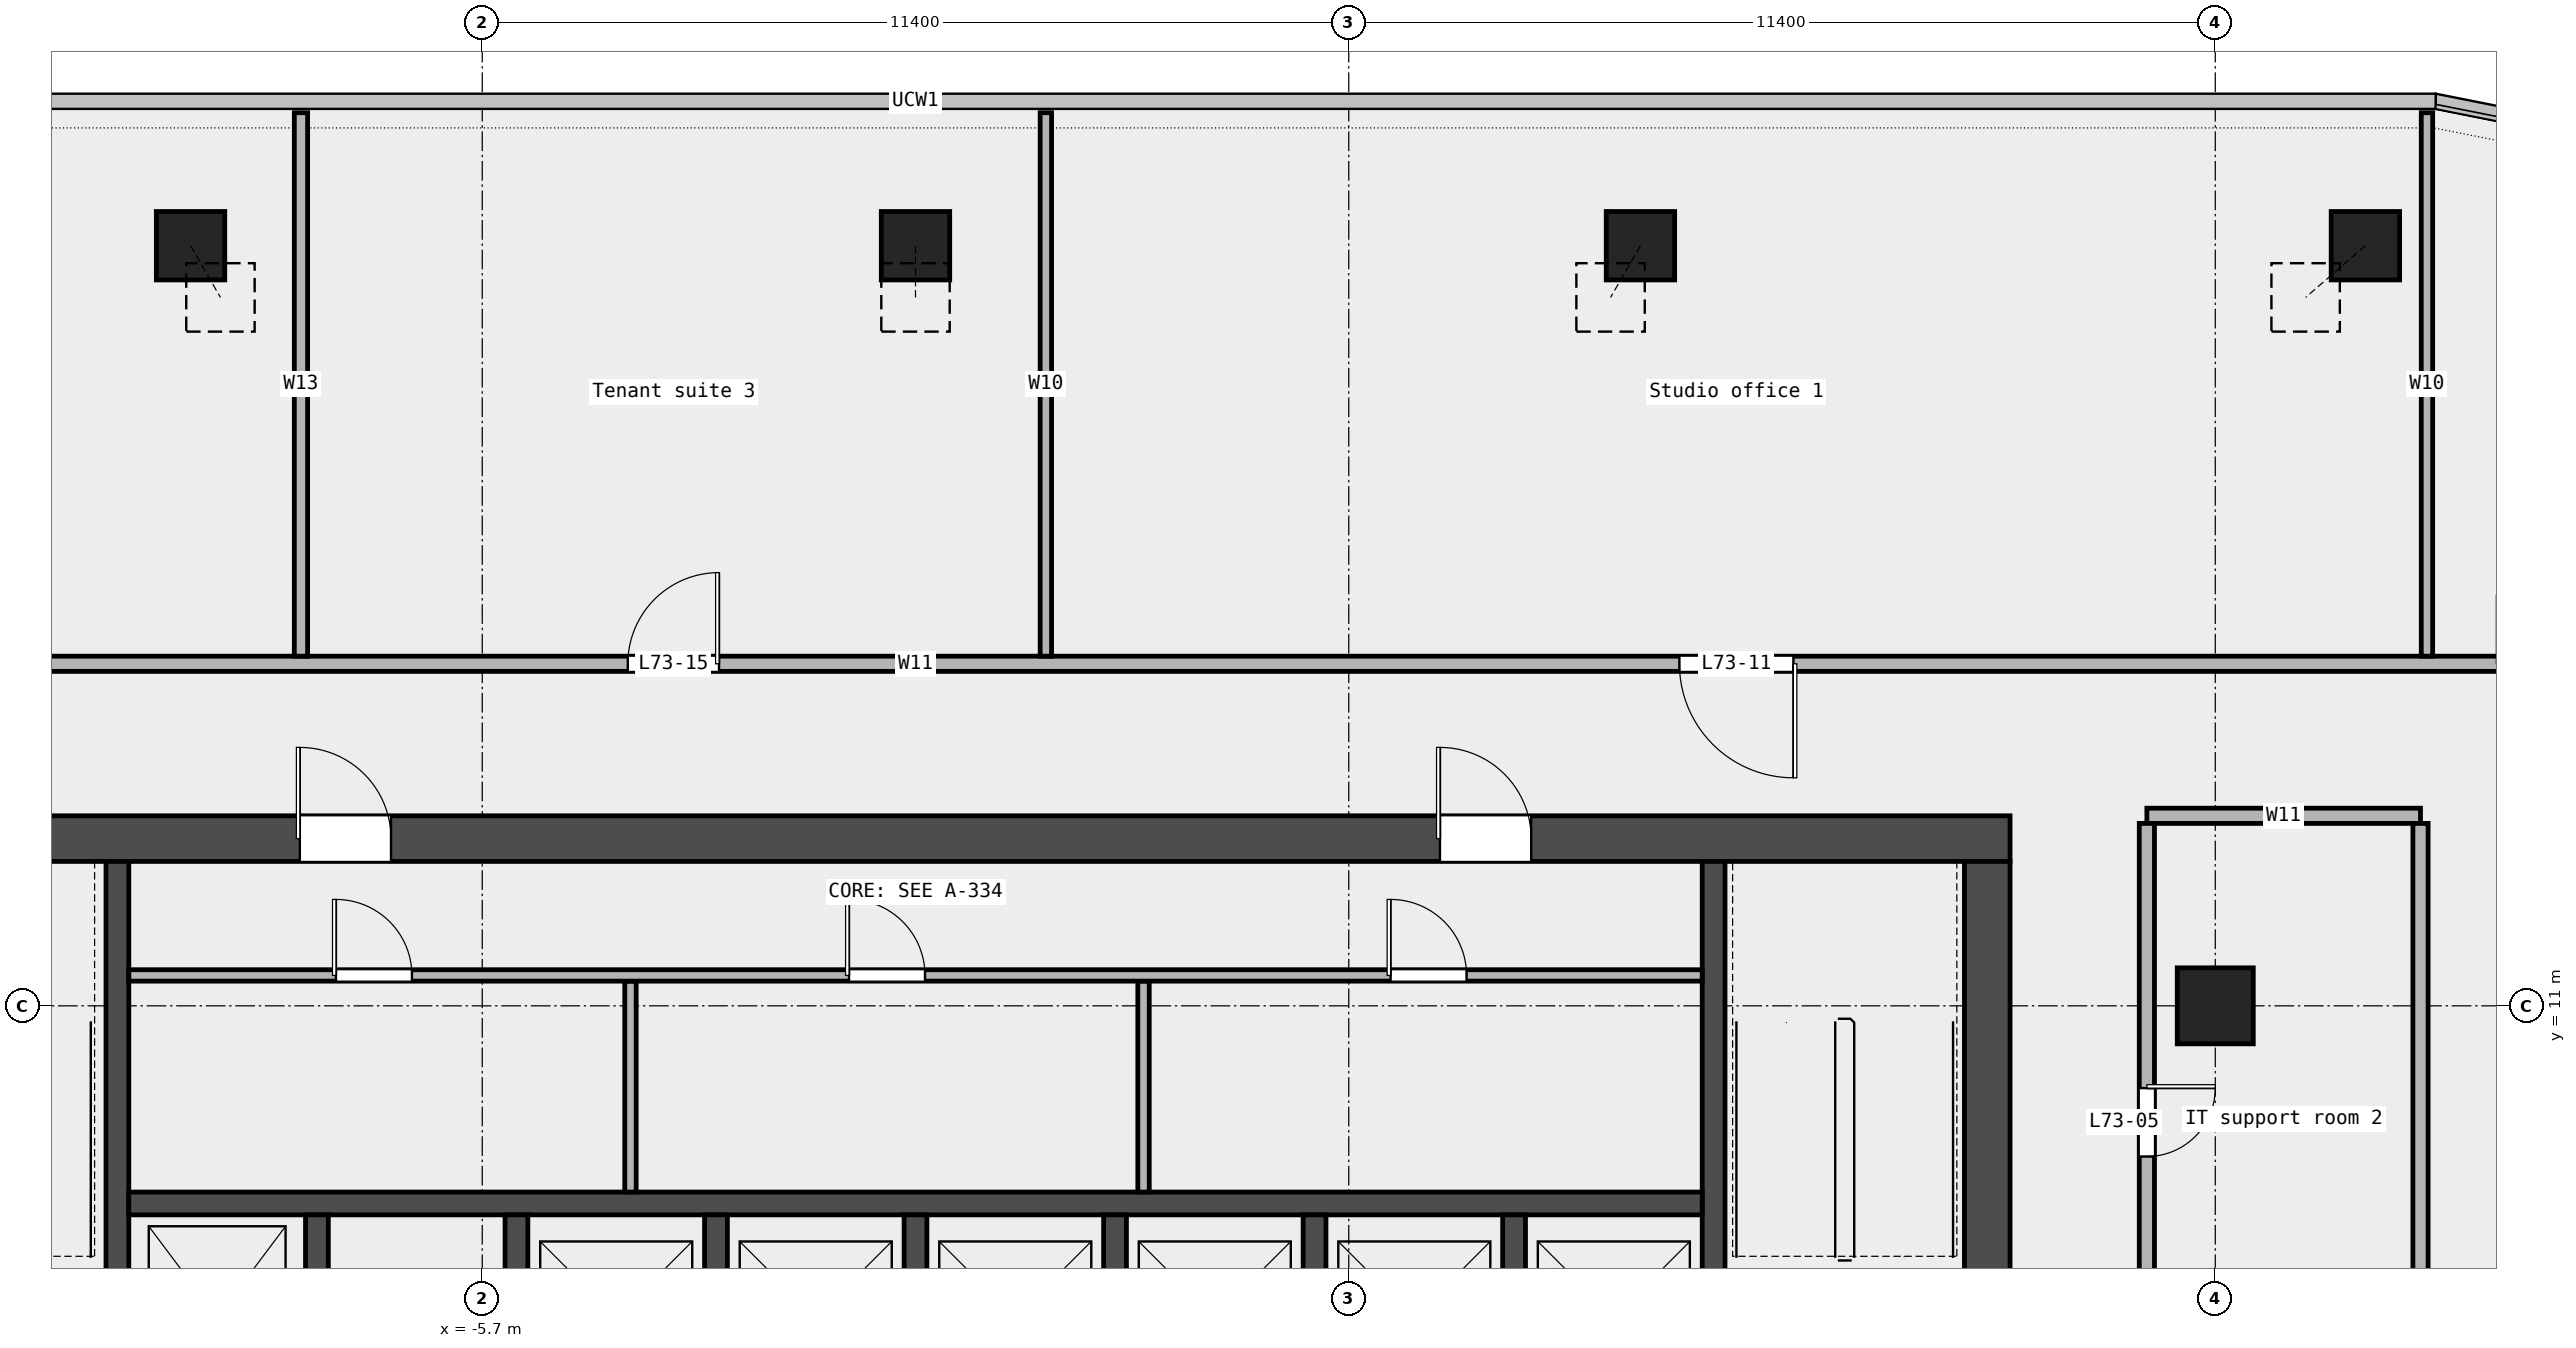
"""IFC4 building model, lengths in metres.
Left out: names, types, materials, properties, quantities, classifications, styles, units other than length and angle.
Written with IfcOpenShell. Run it as: python <this file> out.ifc"""

import sys

from ifc_helpers import new_model, si_unit, direction, frame, frame_2d, origin, origin_2d, place, context, subcontext, project, spatial, rectangle, extrude, element, fill, save


model = new_model("IFC4")
c1 = context("Model", 3, precision=1e-05, world=origin(), true_north=direction((0.0, 1.0)))
c2 = subcontext(c1, "Body", "Model", "MODEL_VIEW")
j1 = project(units=[si_unit("LENGTHUNIT", "METRE"), si_unit("PLANEANGLEUNIT", "RADIAN")], contexts=[c1])
p1 = place(None, origin())
s1 = spatial("IfcSite", under=j1, at=p1, CompositionType="ELEMENT")
p2 = place(p1, origin())
s2 = spatial("IfcBuilding", under=s1, at=p2, CompositionType="ELEMENT")
p3 = place(p2, frame((0.0, 0.0, 333.4)))
s3 = spatial("IfcBuildingStorey", under=s2, at=p3, CompositionType="ELEMENT", Elevation=333.4)
p4 = place(p3, frame((19.075, 21.0, 0.0), z_axis=(-0.221170997512, -0.19123291775, 0.95630191939), x_axis=(0.654053885671, -0.756447958976, 0.0)))
e1 = element("IfcColumn", 1, at=p4, inside=s3, PredefinedType="COLUMN", context=c2, shape_type="SweptSolid", body=[
    extrude(rectangle(XDim=0.9, YDim=0.9, at=origin_2d()), origin(), (0.0, 0.0, 1.0), 3.555),
])
p5 = place(p3, frame((9.538, 21.0, 0.0), z_axis=(-0.112706165104, -0.194839646068, 0.974338151089), x_axis=(0.865610650408, -0.500717686825, 0.0)))
e2 = element("IfcColumn", 2, at=p5, inside=s3, PredefinedType="COLUMN", context=c2, shape_type="SweptSolid", body=[
    extrude(rectangle(XDim=0.9, YDim=0.9, at=origin_2d()), origin(), (0.0, 0.0, 1.0), 3.49),
])
p6 = place(p3, frame((0.0, 21.0, 0.0), z_axis=(0.0, -0.19608905468, 0.980586091394), x_axis=(1.0, 0.0, 0.0)))
e3 = element("IfcColumn", 3, at=p6, inside=s3, PredefinedType="COLUMN", context=c2, shape_type="SweptSolid", body=[
    extrude(rectangle(XDim=0.9, YDim=0.9, at=origin_2d()), origin(), (0.0, 0.0, 1.0), 3.468),
])
p7 = place(p3, frame((-9.538, 21.0, 0.0), z_axis=(0.112706165104, -0.194839646068, 0.974338151089), x_axis=(0.865610650408, 0.500717686825, 0.0)))
e4 = element("IfcColumn", 4, at=p7, inside=s3, PredefinedType="COLUMN", context=c2, shape_type="SweptSolid", body=[
    extrude(rectangle(XDim=0.9, YDim=0.9, at=origin_2d()), origin(), (0.0, 0.0, 1.0), 3.49),
])
p8 = place(p3, frame((17.1, 11.0, 0.0), z_axis=(0.0, 0.0, 1.0), x_axis=(1.0, 0.0, 0.0)))
e5 = element("IfcColumn", 5, at=p8, inside=s3, PredefinedType="COLUMN", context=c2, shape_type="SweptSolid", body=[
    extrude(rectangle(XDim=1.0, YDim=1.0, at=origin_2d()), origin(), (0.0, 0.0, 1.0), 3.4),
])
p9 = place(p3, frame((16.2, 13.5, 0.0), z_axis=(0.0, 0.0, 1.0), x_axis=(1.0, 0.0, 0.0)))
e6 = element("IfcWall", 6, at=p9, inside=s3, PredefinedType="PARTITIONING", context=c2, shape_type="SweptSolid", body=[
    extrude(rectangle(XDim=3.6, YDim=0.2, at=frame_2d((1.8, 0.0))), origin(), (0.0, 0.0, 1.0), 3.4),
])
p10 = place(p3, frame((-22.7, 15.5, 0.0), z_axis=(0.0, 0.0, 1.0), x_axis=(1.0, 0.0, 0.0)))
e7 = element("IfcWall", 7, at=p10, inside=s3, PredefinedType="PARTITIONING", context=c2, shape_type="SweptSolid", body=[
    extrude(rectangle(XDim=45.4, YDim=0.2, at=frame_2d((22.7, 0.0))), origin(), (0.0, 0.0, 1.0), 3.4),
])
p11 = place(p10, frame((43.542, 0.0, 0.0)))
e8 = element("IfcOpeningElement", 8, at=p11, cuts=e7, PredefinedType="OPENING", context=c2, shape_type="SweptSolid", body=[
    extrude(rectangle(XDim=0.9, YDim=2.1, at=frame_2d((0.45, 1.05))), frame((0.0, 0.112, 0.0), z_axis=(0.0, -1.0, 0.0), x_axis=(1.0, 0.0, 0.0)), (0.0, 0.0, 1.0), 0.224),
])
p12 = place(p10, frame((32.75, 0.0, 0.0)))
e9 = element("IfcOpeningElement", 9, at=p12, cuts=e7, PredefinedType="OPENING", context=c2, shape_type="SweptSolid", body=[
    extrude(rectangle(XDim=1.5, YDim=2.1, at=frame_2d((0.75, 1.05))), frame((0.0, 0.112, 0.0), z_axis=(0.0, -1.0, 0.0), x_axis=(1.0, 0.0, 0.0)), (0.0, 0.0, 1.0), 0.224),
])
p13 = place(p10, frame((18.915, 0.0, 0.0)))
e10 = element("IfcOpeningElement", 10, at=p13, cuts=e7, PredefinedType="OPENING", context=c2, shape_type="SweptSolid", body=[
    extrude(rectangle(XDim=1.2, YDim=2.1, at=frame_2d((0.6, 1.05))), frame((0.0, 0.112, 0.0), z_axis=(0.0, -1.0, 0.0), x_axis=(1.0, 0.0, 0.0)), (0.0, 0.0, 1.0), 0.224),
])
p14 = place(p10, frame((6.558, 0.0, 0.0)))
e11 = element("IfcOpeningElement", 11, at=p14, cuts=e7, PredefinedType="OPENING", context=c2, shape_type="SweptSolid", body=[
    extrude(rectangle(XDim=1.5, YDim=2.1, at=frame_2d((0.75, 1.05))), frame((0.0, 0.112, 0.0), z_axis=(0.0, -1.0, 0.0), x_axis=(1.0, 0.0, 0.0)), (0.0, 0.0, 1.0), 0.224),
])
p15 = place(p3, frame((-8.085, 15.6, 0.0), z_axis=(0.0, 0.0, 1.0), x_axis=(0.0, 1.0, 0.0)))
e12 = element("IfcWall", 12, at=p15, inside=s3, PredefinedType="PARTITIONING", context=c2, shape_type="SweptSolid", body=[
    extrude(rectangle(XDim=7.15, YDim=0.175, at=frame_2d((3.575, 0.0))), origin(), (0.0, 0.0, 1.0), 3.4),
])
p16 = place(p3, frame((1.715, 15.6, 0.0), z_axis=(0.0, 0.0, 1.0), x_axis=(0.0, 1.0, 0.0)))
e13 = element("IfcWall", 13, at=p16, inside=s3, PredefinedType="PARTITIONING", context=c2, shape_type="SweptSolid", body=[
    extrude(rectangle(XDim=7.15, YDim=0.15, at=frame_2d((3.575, 0.0))), origin(), (0.0, 0.0, 1.0), 3.4),
])
p17 = place(p3, frame((16.2, -0.74, 0.0), z_axis=(0.0, 0.0, 1.0), x_axis=(0.0, 1.0, 0.0)))
e14 = element("IfcWall", 14, at=p17, inside=s3, PredefinedType="PARTITIONING", context=c2, shape_type="SweptSolid", body=[
    extrude(rectangle(XDim=14.14, YDim=0.2, at=frame_2d((7.07, 0.0))), origin(), (0.0, 0.0, 1.0), 3.4),
])
p18 = place(p17, frame((9.758, 0.0, 0.0)))
e15 = element("IfcOpeningElement", 15, at=p18, cuts=e14, PredefinedType="OPENING", context=c2, shape_type="SweptSolid", body=[
    extrude(rectangle(XDim=0.9, YDim=2.1, at=frame_2d((0.45, 1.05))), frame((0.0, 0.112, 0.0), z_axis=(0.0, -1.0, 0.0), x_axis=(1.0, 0.0, 0.0)), (0.0, 0.0, 1.0), 0.224),
])
p19 = place(p17, frame((2.637, 0.0, 0.0)))
e16 = element("IfcOpeningElement", 16, at=p19, cuts=e14, PredefinedType="OPENING", context=c2, shape_type="SweptSolid", body=[
    extrude(rectangle(XDim=1.0, YDim=2.1, at=frame_2d((0.5, 1.05))), frame((0.0, 0.112, 0.0), z_axis=(0.0, -1.0, 0.0), x_axis=(1.0, 0.0, 0.0)), (0.0, 0.0, 1.0), 0.224),
])
p20 = place(p3, frame((19.8, -0.74, 0.0), z_axis=(0.0, 0.0, 1.0), x_axis=(0.0, 1.0, 0.0)))
e17 = element("IfcWall", 17, at=p20, inside=s3, PredefinedType="PARTITIONING", context=c2, shape_type="SweptSolid", body=[
    extrude(rectangle(XDim=14.14, YDim=0.2, at=frame_2d((7.07, 0.0))), origin(), (0.0, 0.0, 1.0), 3.4),
])
p21 = place(p3, frame((19.885, 15.6, 0.0), z_axis=(0.0, 0.0, 1.0), x_axis=(0.0, 1.0, 0.0)))
e18 = element("IfcWall", 18, at=p21, inside=s3, PredefinedType="PARTITIONING", context=c2, shape_type="SweptSolid", body=[
    extrude(rectangle(XDim=7.15, YDim=0.15, at=frame_2d((3.575, 0.0))), origin(), (0.0, 0.0, 1.0), 3.4),
])
p22 = place(p3, frame((-14.4, 13.2, 0.0), z_axis=(0.0, 0.0, 1.0), x_axis=(1.0, 0.0, 0.0)))
e19 = element("IfcWall", 19, at=p22, inside=s3, PredefinedType="SHEAR", context=c2, shape_type="SweptSolid", body=[
    extrude(rectangle(XDim=28.8, YDim=0.6, at=frame_2d((14.4, 0.0))), origin(), (0.0, 0.0, 1.0), 3.7),
])
p23 = place(p22, frame((6.3, 0.0, 0.0)))
e20 = element("IfcOpeningElement", 20, at=p23, cuts=e19, PredefinedType="OPENING", context=c2, shape_type="SweptSolid", body=[
    extrude(rectangle(XDim=1.2, YDim=2.1, at=frame_2d((0.6, 1.05))), frame((0.0, 0.312, 0.0), z_axis=(0.0, -1.0, 0.0), x_axis=(1.0, 0.0, 0.0)), (0.0, 0.0, 1.0), 0.624),
])
p24 = place(p22, frame((21.3, 0.0, 0.0)))
e21 = element("IfcOpeningElement", 21, at=p24, cuts=e19, PredefinedType="OPENING", context=c2, shape_type="SweptSolid", body=[
    extrude(rectangle(XDim=1.2, YDim=2.1, at=frame_2d((0.6, 1.05))), frame((0.0, 0.312, 0.0), z_axis=(0.0, -1.0, 0.0), x_axis=(1.0, 0.0, 0.0)), (0.0, 0.0, 1.0), 0.624),
])
p25 = place(p3, frame((14.1, -6.6, 0.0), z_axis=(0.0, 0.0, 1.0), x_axis=(0.0, 1.0, 0.0)))
e22 = element("IfcWall", 22, at=p25, inside=s3, PredefinedType="SHEAR", context=c2, shape_type="SweptSolid", body=[
    extrude(rectangle(XDim=19.5, YDim=0.6, at=frame_2d((9.75, 0.0))), origin(), (0.0, 0.0, 1.0), 3.7),
])
p26 = place(p25, frame((9.3, 0.0, 0.0)))
e23 = element("IfcOpeningElement", 23, at=p26, cuts=e22, PredefinedType="OPENING", context=c2, shape_type="SweptSolid", body=[
    extrude(rectangle(XDim=1.8, YDim=2.1, at=frame_2d((0.9, 1.05))), frame((0.0, 0.312, 0.0), z_axis=(0.0, -1.0, 0.0), x_axis=(1.0, 0.0, 0.0)), (0.0, 0.0, 1.0), 0.624),
])
for number, where, z_axis, x_axis in (
    (24, (-10.5, 5.25, 0.0), (0.0, 0.0, 1.0), (0.0, 1.0, 0.0)),
    (25, (10.5, 5.25, 0.0), (0.0, 0.0, 1.0), (0.0, 1.0, 0.0)),
):
    element("IfcWall", number, at=place(p3, frame(where, z_axis=z_axis, x_axis=x_axis)), inside=s3, PredefinedType="SHEAR", context=c2, shape_type="SweptSolid", body=[
        extrude(rectangle(XDim=7.65, YDim=0.3, at=frame_2d((3.825, 0.0))), origin(), (0.0, 0.0, 1.0), 3.7),
    ])
p27 = place(p3, frame((-10.35, 8.4, 0.0), z_axis=(0.0, 0.0, 1.0), x_axis=(1.0, 0.0, 0.0)))
e26 = element("IfcWall", 26, at=p27, inside=s3, PredefinedType="SOLIDWALL", context=c2, shape_type="SweptSolid", body=[
    extrude(rectangle(XDim=20.7, YDim=0.3, at=frame_2d((10.35, 0.0))), origin(), (0.0, 0.0, 1.0), 3.7),
])
for number, where, z_axis, x_axis in (
    (27, (-7.875, 5.55, 0.0), (0.0, 0.0, 1.0), (0.0, 1.0, 0.0)),
    (28, (-5.25, 5.55, 0.0), (0.0, 0.0, 1.0), (0.0, 1.0, 0.0)),
    (29, (-2.625, 5.55, 0.0), (0.0, 0.0, 1.0), (0.0, 1.0, 0.0)),
    (30, (0.0, 5.55, 0.0), (0.0, 0.0, 1.0), (0.0, 1.0, 0.0)),
    (31, (2.625, 5.55, 0.0), (0.0, 0.0, 1.0), (0.0, 1.0, 0.0)),
    (32, (5.25, 5.55, 0.0), (0.0, 0.0, 1.0), (0.0, 1.0, 0.0)),
    (33, (7.875, 5.55, 0.0), (0.0, 0.0, 1.0), (0.0, 1.0, 0.0)),
):
    element("IfcWall", number, at=place(p3, frame(where, z_axis=z_axis, x_axis=x_axis)), inside=s3, PredefinedType="SOLIDWALL", context=c2, shape_type="SweptSolid", body=[
        extrude(rectangle(XDim=2.7, YDim=0.3, at=frame_2d((1.35, 0.0))), origin(), (0.0, 0.0, 1.0), 3.7),
    ])
for number, where, z_axis, x_axis in (
    (34, (-3.75, 8.55, 0.0), (0.0, 0.0, 1.0), (0.0, 1.0, 0.0)),
    (35, (3.0, 8.55, 0.0), (0.0, 0.0, 1.0), (0.0, 1.0, 0.0)),
):
    element("IfcWall", number, at=place(p3, frame(where, z_axis=z_axis, x_axis=x_axis)), inside=s3, PredefinedType="PARTITIONING", context=c2, shape_type="SweptSolid", body=[
        extrude(rectangle(XDim=2.775, YDim=0.15, at=frame_2d((1.387, 0.0))), origin(), (0.0, 0.0, 1.0), 3.7),
    ])
p28 = place(p3, frame((-10.35, 11.4, 0.0), z_axis=(0.0, 0.0, 1.0), x_axis=(1.0, 0.0, 0.0)))
e36 = element("IfcWall", 36, at=p28, inside=s3, PredefinedType="PARTITIONING", context=c2, shape_type="SweptSolid", body=[
    extrude(rectangle(XDim=20.7, YDim=0.15, at=frame_2d((10.35, 0.0))), origin(), (0.0, 0.0, 1.0), 3.7),
])
p29 = place(p28, frame((2.725, 0.0, 0.0)))
e37 = element("IfcOpeningElement", 37, at=p29, cuts=e36, PredefinedType="OPENING", context=c2, shape_type="SweptSolid", body=[
    extrude(rectangle(XDim=1.0, YDim=2.1, at=frame_2d((0.5, 1.05))), frame((0.0, 0.087, 0.0), z_axis=(0.0, -1.0, 0.0), x_axis=(1.0, 0.0, 0.0)), (0.0, 0.0, 1.0), 0.174),
])
p30 = place(p28, frame((9.475, 0.0, 0.0)))
e38 = element("IfcOpeningElement", 38, at=p30, cuts=e36, PredefinedType="OPENING", context=c2, shape_type="SweptSolid", body=[
    extrude(rectangle(XDim=1.0, YDim=2.1, at=frame_2d((0.5, 1.05))), frame((0.0, 0.087, 0.0), z_axis=(0.0, -1.0, 0.0), x_axis=(1.0, 0.0, 0.0)), (0.0, 0.0, 1.0), 0.174),
])
p31 = place(p28, frame((16.6, 0.0, 0.0)))
e39 = element("IfcOpeningElement", 39, at=p31, cuts=e36, PredefinedType="OPENING", context=c2, shape_type="SweptSolid", body=[
    extrude(rectangle(XDim=1.0, YDim=2.1, at=frame_2d((0.5, 1.05))), frame((0.0, 0.087, 0.0), z_axis=(0.0, -1.0, 0.0), x_axis=(1.0, 0.0, 0.0)), (0.0, 0.0, 1.0), 0.174),
])
p32 = place(p18, origin())
e40 = element("IfcDoor", 40, at=p32, inside=s3, OperationType="SINGLE_SWING_LEFT", PredefinedType="DOOR", context=c2, shape_type="SweptSolid", body=[
    extrude(rectangle(XDim=0.9, YDim=2.1, at=frame_2d((0.45, 1.05))), frame((0.0, 0.025, 0.0), z_axis=(0.0, -1.0, 0.0), x_axis=(1.0, 0.0, 0.0)), (0.0, 0.0, 1.0), 0.05),
])
fill(e15, e40)
p33 = place(p12, origin())
e41 = element("IfcDoor", 41, at=p33, inside=s3, OperationType="DOUBLE_DOOR_SINGLE_SWING", PredefinedType="DOOR", context=c2, shape_type="SweptSolid", body=[
    extrude(rectangle(XDim=1.5, YDim=2.1, at=frame_2d((0.75, 1.05))), frame((0.0, 0.025, 0.0), z_axis=(0.0, -1.0, 0.0), x_axis=(1.0, 0.0, 0.0)), (0.0, 0.0, 1.0), 0.05),
])
fill(e9, e41)
p34 = place(p13, origin())
e42 = element("IfcDoor", 42, at=p34, inside=s3, OperationType="SINGLE_SWING_RIGHT", PredefinedType="DOOR", context=c2, shape_type="SweptSolid", body=[
    extrude(rectangle(XDim=1.2, YDim=2.1, at=frame_2d((0.6, 1.05))), frame((0.0, 0.025, 0.0), z_axis=(0.0, -1.0, 0.0), x_axis=(1.0, 0.0, 0.0)), (0.0, 0.0, 1.0), 0.05),
])
fill(e10, e42)
p35 = place(p29, origin())
e43 = element("IfcDoor", 43, at=p35, inside=s3, OperationType="SINGLE_SWING_LEFT", PredefinedType="DOOR", context=c2, shape_type="SweptSolid", body=[
    extrude(rectangle(XDim=1.0, YDim=2.1, at=frame_2d((0.5, 1.05))), frame((0.0, 0.025, 0.0), z_axis=(0.0, -1.0, 0.0), x_axis=(1.0, 0.0, 0.0)), (0.0, 0.0, 1.0), 0.05),
])
fill(e37, e43)
p36 = place(p30, origin())
e44 = element("IfcDoor", 44, at=p36, inside=s3, OperationType="SINGLE_SWING_LEFT", PredefinedType="DOOR", context=c2, shape_type="SweptSolid", body=[
    extrude(rectangle(XDim=1.0, YDim=2.1, at=frame_2d((0.5, 1.05))), frame((0.0, 0.025, 0.0), z_axis=(0.0, -1.0, 0.0), x_axis=(1.0, 0.0, 0.0)), (0.0, 0.0, 1.0), 0.05),
])
fill(e38, e44)
p37 = place(p31, origin())
e45 = element("IfcDoor", 45, at=p37, inside=s3, OperationType="SINGLE_SWING_LEFT", PredefinedType="DOOR", context=c2, shape_type="SweptSolid", body=[
    extrude(rectangle(XDim=1.0, YDim=2.1, at=frame_2d((0.5, 1.05))), frame((0.0, 0.025, 0.0), z_axis=(0.0, -1.0, 0.0), x_axis=(1.0, 0.0, 0.0)), (0.0, 0.0, 1.0), 0.05),
])
fill(e39, e45)
p38 = place(p23, origin())
e46 = element("IfcDoor", 46, at=p38, inside=s3, OperationType="SINGLE_SWING_LEFT", PredefinedType="DOOR", context=c2, shape_type="SweptSolid", body=[
    extrude(rectangle(XDim=1.2, YDim=2.1, at=frame_2d((0.6, 1.05))), frame((0.0, 0.025, 0.0), z_axis=(0.0, -1.0, 0.0), x_axis=(1.0, 0.0, 0.0)), (0.0, 0.0, 1.0), 0.05),
])
fill(e20, e46)
p39 = place(p24, origin())
e47 = element("IfcDoor", 47, at=p39, inside=s3, OperationType="SINGLE_SWING_RIGHT", PredefinedType="DOOR", context=c2, shape_type="SweptSolid", body=[
    extrude(rectangle(XDim=1.2, YDim=2.1, at=frame_2d((0.6, 1.05))), frame((0.0, 0.025, 0.0), z_axis=(0.0, -1.0, 0.0), x_axis=(1.0, 0.0, 0.0)), (0.0, 0.0, 1.0), 0.05),
])
fill(e21, e47)
save(model, sys.argv[1])
